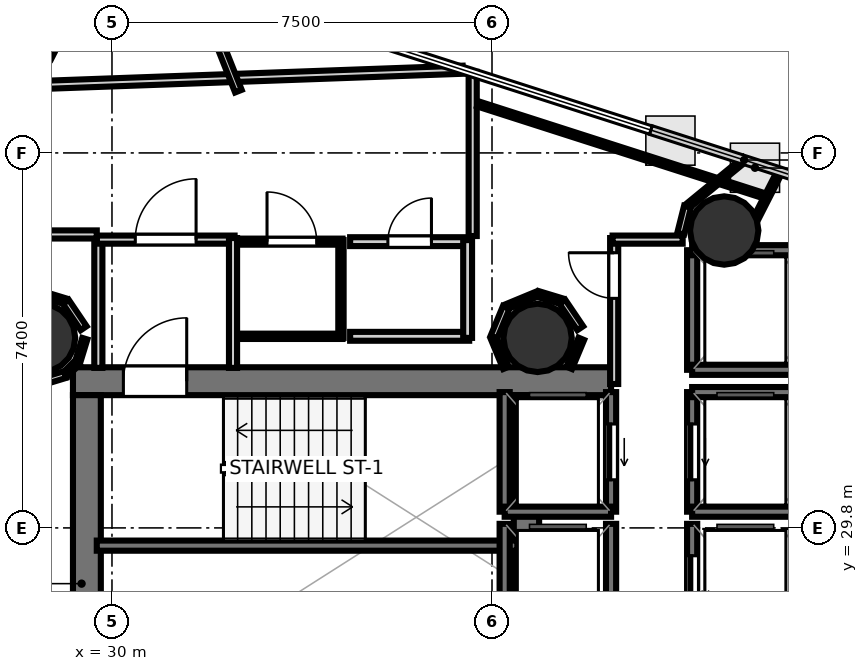
"""IFC4 building model, lengths in metres.
Left out: names, types, materials, properties, quantities, classifications, styles, units other than length and angle.
Written with IfcOpenShell. Run it as: python <this file> out.ifc"""

import sys

from ifc_helpers import new_model, si_unit, direction, frame, frame_2d, origin, origin_2d, place, context, subcontext, project, spatial, rectangle, hollow_circle, extrude, element, fill, save


model = new_model("IFC4")
c1 = context("Model", 3, precision=1e-05, world=origin(), true_north=direction((0.0, 1.0)))
c2 = subcontext(c1, "Body", "Model", "MODEL_VIEW")
j1 = project(units=[si_unit("LENGTHUNIT", "METRE"), si_unit("PLANEANGLEUNIT", "RADIAN")], contexts=[c1])
p1 = place(None, origin())
s1 = spatial("IfcSite", under=j1, at=p1, CompositionType="ELEMENT")
p2 = place(p1, origin())
s2 = spatial("IfcBuilding", under=s1, at=p2, CompositionType="ELEMENT")
p3 = place(p2, frame((0.0, 0.0, 173.5)))
s3 = spatial("IfcBuildingStorey", under=s2, at=p3, CompositionType="ELEMENT", Elevation=173.5)
p4 = place(p3, frame((29.23, 32.695, 0.0), z_axis=(0.0, 0.0, 1.0), x_axis=(1.0, 0.0, 0.0)))
e1 = element("IfcWall", 1, at=p4, inside=s3, PredefinedType="SHEAR", context=c2, shape_type="SweptSolid", body=[
    extrude(rectangle(XDim=10.62, YDim=0.55, at=frame_2d((5.31, 0.0))), origin(), (0.0, 0.0, 1.0), 3.52),
])
p5 = place(p4, frame((0.995, 0.0, 0.0)))
e2 = element("IfcOpeningElement", 2, at=p5, cuts=e1, PredefinedType="OPENING", context=c2, shape_type="SweptSolid", body=[
    extrude(rectangle(XDim=1.25, YDim=2.15, at=frame_2d((0.625, 1.075))), frame((0.0, 0.285, 0.0), z_axis=(0.0, -1.0, 0.0), x_axis=(1.0, 0.0, 0.0)), (0.0, 0.0, 1.0), 0.57),
])
p6 = place(p3, frame((29.505, 24.98, 0.0), z_axis=(0.0, 0.0, 1.0), x_axis=(0.0, 1.0, 0.0)))
e3 = element("IfcWall", 3, at=p6, inside=s3, PredefinedType="SHEAR", context=c2, shape_type="SweptSolid", body=[
    extrude(rectangle(XDim=7.44, YDim=0.55, at=frame_2d((3.72, 0.0))), origin(), (0.0, 0.0, 1.0), 3.52),
])
p7 = place(p3, frame((38.18, 24.98, 0.0), z_axis=(0.0, 0.0, 1.0), x_axis=(0.0, 1.0, 0.0)))
e4 = element("IfcWall", 4, at=p7, inside=s3, PredefinedType="SHEAR", context=c2, shape_type="SweptSolid", body=[
    extrude(rectangle(XDim=7.44, YDim=0.5, at=frame_2d((3.72, 0.0))), origin(), (0.0, 0.0, 1.0), 3.52),
])
for number, where, z_axis, x_axis in (
    (5, (28.6, 33.55, 0.0), (0.0, 0.0, 1.0), (1.0, 0.0, 0.0)),
    (6, (38.4, 33.55, 0.0), (0.0, 0.0, 1.0), (1.0, 0.0, 0.0)),
    (7, (42.083, 35.669, 0.0), (0.0, 0.0, 1.0), (1.0, 0.0, 0.0)),
    (8, (28.235, 39.411, 0.0), (0.0, 0.0, 1.0), (1.0, 0.0, 0.0)),
):
    element("IfcColumn", number, at=place(p3, frame(where, z_axis=z_axis, x_axis=x_axis)), inside=s3, PredefinedType="COLUMN", context=c2, shape_type="SweptSolid", body=[
        extrude(hollow_circle(Radius=0.675, WallThickness=0.032, at=origin_2d()), origin(), (0.0, 0.0, 1.0), 3.7),
    ])
p8 = place(p3, frame((29.7, 29.45, 0.0), z_axis=(0.0, 0.0, 1.0), x_axis=(1.0, 0.0, 0.0)))
e9 = element("IfcWall", 9, at=p8, inside=s3, PredefinedType="SOLIDWALL", context=c2, shape_type="SweptSolid", body=[
    extrude(rectangle(XDim=8.3, YDim=0.2, at=frame_2d((4.15, 0.0))), origin(), (0.0, 0.0, 1.0), 3.52),
])
p9 = place(p3, frame((39.85, 30.12, 0.0), z_axis=(0.0, 0.0, 1.0), x_axis=(0.0, 1.0, 0.0)))
e10 = element("IfcWall", 10, at=p9, inside=s3, PredefinedType="SOLIDWALL", context=c2, shape_type="SweptSolid", body=[
    extrude(rectangle(XDim=2.36, YDim=0.2, at=frame_2d((1.18, 0.0))), origin(), (0.0, 0.0, 1.0), 3.52),
])
p10 = place(p9, frame((0.63, 0.0, 0.0)))
e11 = element("IfcOpeningElement", 11, at=p10, cuts=e10, PredefinedType="OPENING", context=c2, shape_type="SweptSolid", body=[
    extrude(rectangle(XDim=1.1, YDim=2.15, at=frame_2d((0.55, 1.075))), frame((0.0, 0.11, 0.0), z_axis=(0.0, -1.0, 0.0), x_axis=(1.0, 0.0, 0.0)), (0.0, 0.0, 1.0), 0.22),
])
p11 = place(p3, frame((37.75, 30.12, 0.0), z_axis=(0.0, 0.0, 1.0), x_axis=(0.0, 1.0, 0.0)))
e12 = element("IfcWall", 12, at=p11, inside=s3, PredefinedType="SOLIDWALL", context=c2, shape_type="SweptSolid", body=[
    extrude(rectangle(XDim=2.36, YDim=0.2, at=frame_2d((1.18, 0.0))), origin(), (0.0, 0.0, 1.0), 3.52),
])
p12 = place(p3, frame((37.75, 30.12, 0.0), z_axis=(0.0, 0.0, 1.0), x_axis=(1.0, 0.0, 0.0)))
e13 = element("IfcWall", 13, at=p12, inside=s3, PredefinedType="SOLIDWALL", context=c2, shape_type="SweptSolid", body=[
    extrude(rectangle(XDim=2.1, YDim=0.2, at=frame_2d((1.05, 0.0))), origin(), (0.0, 0.0, 1.0), 3.52),
])
p13 = place(p3, frame((41.45, 30.12, 0.0), z_axis=(0.0, 0.0, 1.0), x_axis=(0.0, 1.0, 0.0)))
e14 = element("IfcWall", 14, at=p13, inside=s3, PredefinedType="SOLIDWALL", context=c2, shape_type="SweptSolid", body=[
    extrude(rectangle(XDim=2.36, YDim=0.2, at=frame_2d((1.18, 0.0))), origin(), (0.0, 0.0, 1.0), 3.52),
])
p14 = place(p13, frame((0.63, 0.0, 0.0)))
e15 = element("IfcOpeningElement", 15, at=p14, cuts=e14, PredefinedType="OPENING", context=c2, shape_type="SweptSolid", body=[
    extrude(rectangle(XDim=1.1, YDim=2.15, at=frame_2d((0.55, 1.075))), frame((0.0, 0.11, 0.0), z_axis=(0.0, -1.0, 0.0), x_axis=(1.0, 0.0, 0.0)), (0.0, 0.0, 1.0), 0.22),
])
for number, where, z_axis, x_axis in (
    (16, (41.45, 32.48, 0.0), (0.0, 0.0, 1.0), (1.0, 0.0, 0.0)),
    (17, (41.45, 30.12, 0.0), (0.0, 0.0, 1.0), (1.0, 0.0, 0.0)),
):
    element("IfcWall", number, at=place(p3, frame(where, z_axis=z_axis, x_axis=x_axis)), inside=s3, PredefinedType="SOLIDWALL", context=c2, shape_type="SweptSolid", body=[
        extrude(rectangle(XDim=2.1, YDim=0.2, at=frame_2d((1.05, 0.0))), origin(), (0.0, 0.0, 1.0), 3.52),
    ])
p15 = place(p3, frame((41.45, 27.52, 0.0), z_axis=(0.0, 0.0, 1.0), x_axis=(0.0, 1.0, 0.0)))
e18 = element("IfcWall", 18, at=p15, inside=s3, PredefinedType="SOLIDWALL", context=c2, shape_type="SweptSolid", body=[
    extrude(rectangle(XDim=2.36, YDim=0.2, at=frame_2d((1.18, 0.0))), origin(), (0.0, 0.0, 1.0), 3.52),
])
p16 = place(p15, frame((0.63, 0.0, 0.0)))
e19 = element("IfcOpeningElement", 19, at=p16, cuts=e18, PredefinedType="OPENING", context=c2, shape_type="SweptSolid", body=[
    extrude(rectangle(XDim=1.1, YDim=2.15, at=frame_2d((0.55, 1.075))), frame((0.0, 0.11, 0.0), z_axis=(0.0, -1.0, 0.0), x_axis=(1.0, 0.0, 0.0)), (0.0, 0.0, 1.0), 0.22),
])
for number, where, z_axis, x_axis in (
    (20, (39.85, 27.52, 0.0), (0.0, 0.0, 1.0), (0.0, 1.0, 0.0)),
    (21, (37.75, 27.52, 0.0), (0.0, 0.0, 1.0), (0.0, 1.0, 0.0)),
):
    element("IfcWall", number, at=place(p3, frame(where, z_axis=z_axis, x_axis=x_axis)), inside=s3, PredefinedType="SOLIDWALL", context=c2, shape_type="SweptSolid", body=[
        extrude(rectangle(XDim=2.36, YDim=0.2, at=frame_2d((1.18, 0.0))), origin(), (0.0, 0.0, 1.0), 3.52),
    ])
p17 = place(p3, frame((41.45, 32.92, 0.0), z_axis=(0.0, 0.0, 1.0), x_axis=(0.0, 1.0, 0.0)))
e22 = element("IfcWall", 22, at=p17, inside=s3, PredefinedType="SOLIDWALL", context=c2, shape_type="SweptSolid", body=[
    extrude(rectangle(XDim=2.36, YDim=0.2, at=frame_2d((1.18, 0.0))), origin(), (0.0, 0.0, 1.0), 3.52),
])
for number, where, z_axis, x_axis in (
    (23, (41.45, 35.28, 0.0), (0.0, 0.0, 1.0), (1.0, 0.0, 0.0)),
    (24, (41.45, 32.92, 0.0), (0.0, 0.0, 1.0), (1.0, 0.0, 0.0)),
):
    element("IfcWall", number, at=place(p3, frame(where, z_axis=z_axis, x_axis=x_axis)), inside=s3, PredefinedType="SOLIDWALL", context=c2, shape_type="SweptSolid", body=[
        extrude(rectangle(XDim=2.1, YDim=0.2, at=frame_2d((1.05, 0.0))), origin(), (0.0, 0.0, 1.0), 3.52),
    ])
p18 = place(p3, frame((29.731, 32.958, 0.0), z_axis=(0.0, 0.0, 1.0), x_axis=(0.0, 1.0, 0.0)))
e25 = element("IfcWall", 25, at=p18, inside=s3, PredefinedType="PARTITIONING", context=c2, shape_type="SweptSolid", body=[
    extrude(rectangle(XDim=2.562, YDim=0.16, at=frame_2d((1.281, 0.0))), origin(), (0.0, 0.0, 1.0), 2.84),
])
p19 = place(p3, frame((29.7, 35.489, 0.0), z_axis=(0.0, 0.0, 1.0), x_axis=(1.0, 0.0, 0.0)))
e26 = element("IfcWall", 26, at=p19, inside=s3, PredefinedType="PARTITIONING", context=c2, shape_type="SweptSolid", body=[
    extrude(rectangle(XDim=2.72, YDim=0.16, at=frame_2d((1.36, 0.0))), origin(), (0.0, 0.0, 1.0), 2.84),
])
p20 = place(p19, frame((0.76, 0.0, 0.0)))
e27 = element("IfcOpeningElement", 27, at=p20, cuts=e26, PredefinedType="OPENING", context=c2, shape_type="SweptSolid", body=[
    extrude(rectangle(XDim=1.2, YDim=2.15, at=frame_2d((0.6, 1.075))), frame((0.0, 0.09, 0.0), z_axis=(0.0, -1.0, 0.0), x_axis=(1.0, 0.0, 0.0)), (0.0, 0.0, 1.0), 0.18),
])
p21 = place(p3, frame((32.389, 35.52, 0.0), z_axis=(0.0, 0.0, 1.0), x_axis=(0.0, -1.0, 0.0)))
e28 = element("IfcWall", 28, at=p21, inside=s3, PredefinedType="PARTITIONING", context=c2, shape_type="SweptSolid", body=[
    extrude(rectangle(XDim=2.562, YDim=0.16, at=frame_2d((1.281, 0.0))), origin(), (0.0, 0.0, 1.0), 2.84),
])
p22 = place(p3, frame((39.911, 32.64, 0.0), z_axis=(0.0, 0.0, 1.0), x_axis=(0.0, 1.0, 0.0)))
e29 = element("IfcWall", 29, at=p22, inside=s3, PredefinedType="PARTITIONING", context=c2, shape_type="SweptSolid", body=[
    extrude(rectangle(XDim=2.88, YDim=0.16, at=frame_2d((1.44, 0.0))), origin(), (0.0, 0.0, 1.0), 2.84),
])
p23 = place(p22, frame((1.69, 0.0, 0.0)))
e30 = element("IfcOpeningElement", 30, at=p23, cuts=e29, PredefinedType="OPENING", context=c2, shape_type="SweptSolid", body=[
    extrude(rectangle(XDim=0.9, YDim=2.1, at=frame_2d((0.45, 1.05))), frame((0.0, 0.09, 0.0), z_axis=(0.0, -1.0, 0.0), x_axis=(1.0, 0.0, 0.0)), (0.0, 0.0, 1.0), 0.18),
])
p24 = place(p3, frame((39.88, 35.489, 0.0), z_axis=(0.0, 0.0, 1.0), x_axis=(1.0, 0.0, 0.0)))
e31 = element("IfcWall", 31, at=p24, inside=s3, PredefinedType="PARTITIONING", context=c2, shape_type="SweptSolid", body=[
    extrude(rectangle(XDim=1.383, YDim=0.16, at=frame_2d((0.691, 0.0))), origin(), (0.0, 0.0, 1.0), 2.84),
])
p25 = place(p3, frame((34.55, 33.581, 0.0), z_axis=(0.0, 0.0, 1.0), x_axis=(-1.0, 0.0, 0.0)))
e32 = element("IfcWall", 32, at=p25, inside=s3, PredefinedType="PARTITIONING", context=c2, shape_type="SweptSolid", body=[
    extrude(rectangle(XDim=2.0, YDim=0.105, at=frame_2d((1.0, 0.0))), origin(), (0.0, 0.0, 1.0), 2.84),
])
p26 = place(p3, frame((32.55, 35.449, 0.0), z_axis=(0.0, 0.0, 1.0), x_axis=(1.0, 0.0, 0.0)))
e33 = element("IfcWall", 33, at=p26, inside=s3, PredefinedType="PARTITIONING", context=c2, shape_type="SweptSolid", body=[
    extrude(rectangle(XDim=2.0, YDim=0.12, at=frame_2d((1.0, 0.0))), origin(), (0.0, 0.0, 1.0), 2.84),
])
p27 = place(p26, frame((0.51, 0.0, 0.0)))
e34 = element("IfcOpeningElement", 34, at=p27, cuts=e33, PredefinedType="OPENING", context=c2, shape_type="SweptSolid", body=[
    extrude(rectangle(XDim=0.98, YDim=2.1, at=frame_2d((0.49, 1.05))), frame((0.0, 0.07, 0.0), z_axis=(0.0, -1.0, 0.0), x_axis=(1.0, 0.0, 0.0)), (0.0, 0.0, 1.0), 0.14),
])
p28 = place(p3, frame((34.519, 35.48, 0.0), z_axis=(0.0, 0.0, 1.0), x_axis=(0.0, -1.0, 0.0)))
e35 = element("IfcWall", 35, at=p28, inside=s3, PredefinedType="PARTITIONING", context=c2, shape_type="SweptSolid", body=[
    extrude(rectangle(XDim=1.93, YDim=0.105, at=frame_2d((0.965, 0.0))), origin(), (0.0, 0.0, 1.0), 2.84),
])
p29 = place(p3, frame((37.05, 33.581, 0.0), z_axis=(0.0, 0.0, 1.0), x_axis=(-1.0, 0.0, 0.0)))
e36 = element("IfcWall", 36, at=p29, inside=s3, PredefinedType="PLUMBINGWALL", context=c2, shape_type="SweptSolid", body=[
    extrude(rectangle(XDim=2.35, YDim=0.175, at=frame_2d((1.175, 0.0))), origin(), (0.0, 0.0, 1.0), 2.84),
])
p30 = place(p3, frame((34.7, 35.449, 0.0), z_axis=(0.0, 0.0, 1.0), x_axis=(1.0, 0.0, 0.0)))
e37 = element("IfcWall", 37, at=p30, inside=s3, PredefinedType="PLUMBINGWALL", context=c2, shape_type="SweptSolid", body=[
    extrude(rectangle(XDim=2.35, YDim=0.175, at=frame_2d((1.175, 0.0))), origin(), (0.0, 0.0, 1.0), 2.84),
])
p31 = place(p30, frame((0.745, 0.0, 0.0)))
e38 = element("IfcOpeningElement", 38, at=p31, cuts=e37, PredefinedType="OPENING", context=c2, shape_type="SweptSolid", body=[
    extrude(rectangle(XDim=0.86, YDim=2.05, at=frame_2d((0.43, 1.025))), frame((0.0, 0.097, 0.0), z_axis=(0.0, -1.0, 0.0), x_axis=(1.0, 0.0, 0.0)), (0.0, 0.0, 1.0), 0.195),
])
p32 = place(p3, frame((37.019, 35.48, 0.0), z_axis=(0.0, 0.0, 1.0), x_axis=(0.0, -1.0, 0.0)))
e39 = element("IfcWall", 39, at=p32, inside=s3, PredefinedType="PLUMBINGWALL", context=c2, shape_type="SweptSolid", body=[
    extrude(rectangle(XDim=1.93, YDim=0.175, at=frame_2d((0.965, 0.0))), origin(), (0.0, 0.0, 1.0), 2.84),
])
p33 = place(p3, frame((22.45, 38.319, 0.0), z_axis=(0.0, 0.0, 1.0), x_axis=(0.999347255434, 0.036125656496, 0.0)))
e40 = element("IfcWall", 40, at=p33, inside=s3, PredefinedType="PARTITIONING", context=c2, shape_type="SweptSolid", body=[
    extrude(rectangle(XDim=14.483, YDim=0.16, at=frame_2d((7.241, 0.0))), origin(), (0.0, 0.0, 1.0), 2.84),
])
p34 = place(p3, frame((37.119, 38.799, 0.0), z_axis=(0.0, 0.0, 1.0), x_axis=(0.0, -1.0, 0.0)))
e41 = element("IfcWall", 41, at=p34, inside=s3, PredefinedType="PARTITIONING", context=c2, shape_type="SweptSolid", body=[
    extrude(rectangle(XDim=3.239, YDim=0.16, at=frame_2d((1.62, 0.0))), origin(), (0.0, 0.0, 1.0), 2.84),
])
p35 = place(p3, frame((29.7, 35.591, 0.0), z_axis=(0.0, 0.0, 1.0), x_axis=(-1.0, 0.0, 0.0)))
e42 = element("IfcWall", 42, at=p35, inside=s3, PredefinedType="PARTITIONING", context=c2, shape_type="SweptSolid", body=[
    extrude(rectangle(XDim=3.12, YDim=0.16, at=frame_2d((1.56, 0.0))), origin(), (0.0, 0.0, 1.0), 2.84),
])
p36 = place(p3, frame((42.462, 35.426, 0.0), z_axis=(0.0, 0.0, 1.0), x_axis=(0.454699955927, 0.890644682284, 0.0)))
e43 = element("IfcWall", 43, at=p36, inside=s3, PredefinedType="PARTITIONING", context=c2, shape_type="SweptSolid", body=[
    extrude(rectangle(XDim=1.601, YDim=0.105, at=frame_2d((0.801, 0.0))), origin(), (0.0, 0.0, 1.0), 2.84),
])
p37 = place(p3, frame((39.241, 33.741, 0.0), z_axis=(0.0, 0.0, 1.0), x_axis=(-0.559619584068, 0.828749613048, 0.0)))
e44 = element("IfcWall", 44, at=p37, inside=s3, PredefinedType="PARTITIONING", context=c2, shape_type="SweptSolid", body=[
    extrude(rectangle(XDim=0.629, YDim=0.14, at=frame_2d((0.314, 0.0))), origin(), (0.0, 0.0, 1.0), 2.84),
])
p38 = place(p3, frame((38.873, 34.274, 0.0), z_axis=(0.0, 0.0, 1.0), x_axis=(-0.956850575764, 0.290580411693, 0.0)))
e45 = element("IfcWall", 45, at=p38, inside=s3, PredefinedType="PARTITIONING", context=c2, shape_type="SweptSolid", body=[
    extrude(rectangle(XDim=0.485, YDim=0.12, at=frame_2d((0.242, 0.0))), origin(), (0.0, 0.0, 1.0), 2.84),
])
p39 = place(p3, frame((38.388, 34.414, 0.0), z_axis=(0.0, 0.0, 1.0), x_axis=(-0.924012178777, -0.382363038841, 0.0)))
e46 = element("IfcWall", 46, at=p39, inside=s3, PredefinedType="PARTITIONING", context=c2, shape_type="SweptSolid", body=[
    extrude(rectangle(XDim=0.639, YDim=0.105, at=frame_2d((0.32, 0.0))), origin(), (0.0, 0.0, 1.0), 2.84),
])
p40 = place(p3, frame((37.781, 34.152, 0.0), z_axis=(0.0, 0.0, 1.0), x_axis=(-0.382824178437, -0.923821221018, 0.0)))
e47 = element("IfcWall", 47, at=p40, inside=s3, PredefinedType="PARTITIONING", context=c2, shape_type="SweptSolid", body=[
    extrude(rectangle(XDim=0.639, YDim=0.14, at=frame_2d((0.319, 0.0))), origin(), (0.0, 0.0, 1.0), 2.84),
])
p41 = place(p3, frame((37.536, 33.538, 0.0), z_axis=(0.0, 0.0, 1.0), x_axis=(0.382626535499, -0.923903097912, 0.0)))
e48 = element("IfcWall", 48, at=p41, inside=s3, PredefinedType="PARTITIONING", context=c2, shape_type="SweptSolid", body=[
    extrude(rectangle(XDim=0.628, YDim=0.12, at=frame_2d((0.314, 0.0))), origin(), (0.0, 0.0, 1.0), 2.84),
])
p42 = place(p3, frame((39.023, 32.958, 0.0), z_axis=(0.0, 0.0, 1.0), x_axis=(0.385702795868, 0.922623082987, 0.0)))
e49 = element("IfcWall", 49, at=p42, inside=s3, PredefinedType="PARTITIONING", context=c2, shape_type="SweptSolid", body=[
    extrude(rectangle(XDim=0.622, YDim=0.12, at=frame_2d((0.311, 0.0))), origin(), (0.0, 0.0, 1.0), 2.84),
])
p43 = place(p3, frame((37.22, 38.168, 0.0), z_axis=(0.0, 0.0, 1.0), x_axis=(0.952167427944, -0.305576813849, 0.0)))
e50 = element("IfcWall", 50, at=p43, inside=s3, PredefinedType="PARTITIONING", context=c2, shape_type="SweptSolid", body=[
    extrude(rectangle(XDim=5.904, YDim=0.105, at=frame_2d((2.952, 0.0))), origin(), (0.0, 0.0, 1.0), 2.84),
])
p44 = place(p3, frame((42.487, 37.074, 0.0), z_axis=(0.0, 0.0, 1.0), x_axis=(-0.773083984598, -0.634303675504, 0.0)))
e51 = element("IfcWall", 51, at=p44, inside=s3, PredefinedType="PARTITIONING", context=c2, shape_type="SweptSolid", body=[
    extrude(rectangle(XDim=1.446, YDim=0.105, at=frame_2d((0.723, 0.0))), origin(), (0.0, 0.0, 1.0), 2.84),
])
p45 = place(p3, frame((41.359, 36.14, 0.0), z_axis=(0.0, 0.0, 1.0), x_axis=(-0.243371504092, -0.969933147694, 0.0)))
e52 = element("IfcWall", 52, at=p45, inside=s3, PredefinedType="PARTITIONING", context=c2, shape_type="SweptSolid", body=[
    extrude(rectangle(XDim=0.55, YDim=0.14, at=frame_2d((0.275, 0.0))), origin(), (0.0, 0.0, 1.0), 2.84),
])
p46 = place(p3, frame((31.649, 40.551, 0.0), z_axis=(0.0, 0.0, 1.0), x_axis=(0.36876524787, -0.929522561299, 0.0)))
e53 = element("IfcWall", 53, at=p46, inside=s3, PredefinedType="PARTITIONING", context=c2, shape_type="SweptSolid", body=[
    extrude(rectangle(XDim=2.294, YDim=0.14, at=frame_2d((1.147, 0.0))), origin(), (0.0, 0.0, 1.0), 2.84),
])
p47 = place(p3, frame((29.441, 33.741, 0.0), z_axis=(0.0, 0.0, 1.0), x_axis=(-0.559619584068, 0.828749613048, 0.0)))
e54 = element("IfcWall", 54, at=p47, inside=s3, PredefinedType="PARTITIONING", context=c2, shape_type="SweptSolid", body=[
    extrude(rectangle(XDim=0.629, YDim=0.14, at=frame_2d((0.314, 0.0))), origin(), (0.0, 0.0, 1.0), 2.84),
])
p48 = place(p3, frame((29.073, 34.274, 0.0), z_axis=(0.0, 0.0, 1.0), x_axis=(-0.956893067978, 0.290440452511, 0.0)))
e55 = element("IfcWall", 55, at=p48, inside=s3, PredefinedType="PARTITIONING", context=c2, shape_type="SweptSolid", body=[
    extrude(rectangle(XDim=0.485, YDim=0.12, at=frame_2d((0.243, 0.0))), origin(), (0.0, 0.0, 1.0), 2.84),
])
p49 = place(p3, frame((28.609, 32.685, 0.0), z_axis=(0.0, 0.0, 1.0), x_axis=(0.956893067978, 0.290440452511, 0.0)))
e56 = element("IfcWall", 56, at=p49, inside=s3, PredefinedType="PARTITIONING", context=c2, shape_type="SweptSolid", body=[
    extrude(rectangle(XDim=0.485, YDim=0.14, at=frame_2d((0.243, 0.0))), origin(), (0.0, 0.0, 1.0), 2.84),
])
p50 = place(p3, frame((29.086, 32.834, 0.0), z_axis=(0.0, 0.0, 1.0), x_axis=(0.707106781187, 0.707106781187, 0.0)))
e57 = element("IfcWall", 57, at=p50, inside=s3, PredefinedType="PARTITIONING", context=c2, shape_type="SweptSolid", body=[
    extrude(rectangle(XDim=0.326, YDim=0.12, at=frame_2d((0.163, 0.0))), origin(), (0.0, 0.0, 1.0), 2.84),
])
p51 = place(p3, frame((29.324, 33.077, 0.0), z_axis=(0.0, 0.0, 1.0), x_axis=(0.292866596221, 0.956153312402, 0.0)))
e58 = element("IfcWall", 58, at=p51, inside=s3, PredefinedType="PARTITIONING", context=c2, shape_type="SweptSolid", body=[
    extrude(rectangle(XDim=0.479, YDim=0.105, at=frame_2d((0.239, 0.0))), origin(), (0.0, 0.0, 1.0), 2.84),
])
p52 = place(p5, origin())
e59 = element("IfcDoor", 59, at=p52, inside=s3, OperationType="SINGLE_SWING_RIGHT", PredefinedType="DOOR", context=c2, shape_type="SweptSolid", body=[
    extrude(rectangle(XDim=1.25, YDim=2.15, at=frame_2d((0.625, 1.075))), frame((0.0, 0.025, 0.0), z_axis=(0.0, -1.0, 0.0), x_axis=(1.0, 0.0, 0.0)), (0.0, 0.0, 1.0), 0.05),
])
fill(e2, e59)
p53 = place(p10, origin())
e60 = element("IfcDoor", 60, at=p53, inside=s3, OperationType="SLIDING_TO_LEFT", PredefinedType="DOOR", context=c2, shape_type="SweptSolid", body=[
    extrude(rectangle(XDim=1.1, YDim=2.15, at=frame_2d((0.55, 1.075))), frame((0.0, 0.025, 0.0), z_axis=(0.0, -1.0, 0.0), x_axis=(1.0, 0.0, 0.0)), (0.0, 0.0, 1.0), 0.05),
])
fill(e11, e60)
p54 = place(p14, origin())
e61 = element("IfcDoor", 61, at=p54, inside=s3, OperationType="SLIDING_TO_LEFT", PredefinedType="DOOR", context=c2, shape_type="SweptSolid", body=[
    extrude(rectangle(XDim=1.1, YDim=2.15, at=frame_2d((0.55, 1.075))), frame((0.0, 0.025, 0.0), z_axis=(0.0, -1.0, 0.0), x_axis=(1.0, 0.0, 0.0)), (0.0, 0.0, 1.0), 0.05),
])
fill(e15, e61)
p55 = place(p16, origin())
e62 = element("IfcDoor", 62, at=p55, inside=s3, OperationType="SLIDING_TO_LEFT", PredefinedType="DOOR", context=c2, shape_type="SweptSolid", body=[
    extrude(rectangle(XDim=1.1, YDim=2.15, at=frame_2d((0.55, 1.075))), frame((0.0, 0.025, 0.0), z_axis=(0.0, -1.0, 0.0), x_axis=(1.0, 0.0, 0.0)), (0.0, 0.0, 1.0), 0.05),
])
fill(e19, e62)
p56 = place(p20, origin())
e63 = element("IfcDoor", 63, at=p56, inside=s3, OperationType="SINGLE_SWING_RIGHT", PredefinedType="DOOR", context=c2, shape_type="SweptSolid", body=[
    extrude(rectangle(XDim=1.2, YDim=2.15, at=frame_2d((0.6, 1.075))), frame((0.0, 0.025, 0.0), z_axis=(0.0, -1.0, 0.0), x_axis=(1.0, 0.0, 0.0)), (0.0, 0.0, 1.0), 0.05),
])
fill(e27, e63)
p57 = place(p27, origin())
e64 = element("IfcDoor", 64, at=p57, inside=s3, OperationType="SINGLE_SWING_LEFT", PredefinedType="DOOR", context=c2, shape_type="SweptSolid", body=[
    extrude(rectangle(XDim=0.98, YDim=2.1, at=frame_2d((0.49, 1.05))), frame((0.0, 0.025, 0.0), z_axis=(0.0, -1.0, 0.0), x_axis=(1.0, 0.0, 0.0)), (0.0, 0.0, 1.0), 0.05),
])
fill(e34, e64)
p58 = place(p31, origin())
e65 = element("IfcDoor", 65, at=p58, inside=s3, OperationType="SINGLE_SWING_RIGHT", PredefinedType="DOOR", context=c2, shape_type="SweptSolid", body=[
    extrude(rectangle(XDim=0.86, YDim=2.05, at=frame_2d((0.43, 1.025))), frame((0.0, 0.025, 0.0), z_axis=(0.0, -1.0, 0.0), x_axis=(1.0, 0.0, 0.0)), (0.0, 0.0, 1.0), 0.05),
])
fill(e38, e65)
p59 = place(p23, origin())
e66 = element("IfcDoor", 66, at=p59, inside=s3, OperationType="SINGLE_SWING_RIGHT", PredefinedType="DOOR", context=c2, shape_type="SweptSolid", body=[
    extrude(rectangle(XDim=0.9, YDim=2.1, at=frame_2d((0.45, 1.05))), frame((0.0, 0.025, 0.0), z_axis=(0.0, -1.0, 0.0), x_axis=(1.0, 0.0, 0.0)), (0.0, 0.0, 1.0), 0.05),
])
fill(e30, e66)
save(model, sys.argv[1])
